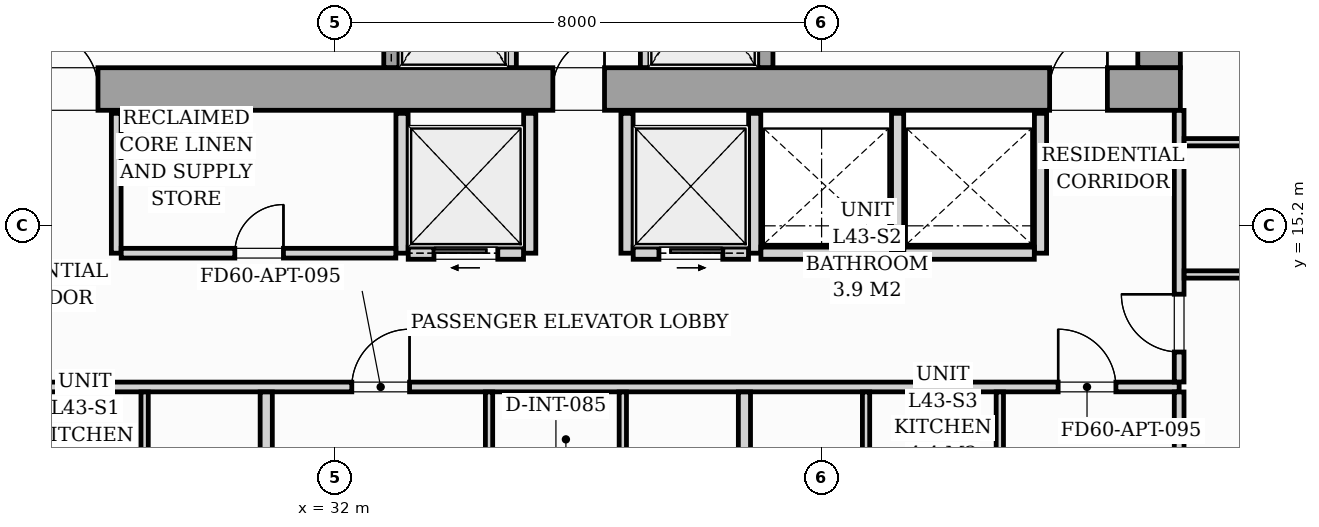
"""IFC4 building model, lengths in metres.
Left out: names, types, materials, properties, quantities, classifications, styles, units other than length and angle.
Written with IfcOpenShell. Run it as: python <this file> out.ifc"""

import sys

from ifc_helpers import new_model, si_unit, direction, frame, frame_2d, origin, origin_2d, place, context, subcontext, project, spatial, rectangle, i_section, extrude, source, transform, mapped, element, fill, save


model = new_model("IFC4")
c1 = context("Model", 3, precision=1e-05, world=origin(), true_north=direction((0.0, 1.0)))
c2 = subcontext(c1, "Body", "Model", "MODEL_VIEW")
j1 = project(units=[si_unit("LENGTHUNIT", "METRE"), si_unit("PLANEANGLEUNIT", "RADIAN")], contexts=[c1])
p1 = place(None, origin())
s1 = spatial("IfcSite", under=j1, at=p1, CompositionType="ELEMENT")
p2 = place(p1, origin())
s2 = spatial("IfcBuilding", under=s1, at=p2, CompositionType="ELEMENT")
p3 = place(p2, frame((0.0, 0.0, 150.2)))
s3 = spatial("IfcBuildingStorey", under=s2, at=p3, CompositionType="ELEMENT", Elevation=150.2)
m1 = source(origin(), c2, "Body", "SweptSolid", [
    extrude(i_section(OverallWidth=0.421, OverallDepth=0.465, WebThickness=0.045, FlangeThickness=0.073, FilletRadius=0.018, at=origin_2d()), origin(), (0.0, 0.0, 1.0), 3.196),
])
for number, where, z_axis, x_axis in (
    (1, (33.12, 17.4, 0.002), (0.0, 0.0, 1.0), (1.0, 0.0, 0.0)),
    (2, (38.88, 17.4, 0.002), (0.0, 0.0, 1.0), (1.0, 0.0, 0.0)),
    (3, (45.6, 17.4, 0.002), (0.0, 0.0, 1.0), (1.0, 0.0, 0.0)),
):
    element("IfcColumn", number, at=place(p3, frame(where, z_axis=z_axis, x_axis=x_axis)), inside=s3, PredefinedType="PILASTER", context=c2, shape_type="MappedRepresentation", body=[
        mapped(m1, transform((0.0, 0.0, 0.0), scale=1.0)),
    ])
p4 = place(p3, frame((26.1, 17.45, 0.0), z_axis=(0.0, 0.0, 1.0), x_axis=(1.0, 0.0, 0.0)))
e4 = element("IfcWall", 4, at=p4, inside=s3, PredefinedType="SHEAR", context=c2, shape_type="SweptSolid", body=[
    extrude(rectangle(XDim=19.8, YDim=0.7, at=frame_2d((9.9, 0.0))), origin(), (0.0, 0.0, 1.0), 3.2),
])
p5 = place(p4, frame((1.05, 0.0, 0.0)))
e5 = element("IfcOpeningElement", 5, at=p5, cuts=e4, PredefinedType="OPENING", context=c2, shape_type="SweptSolid", body=[
    extrude(rectangle(XDim=0.95, YDim=2.06, at=frame_2d((0.475, 1.03))), frame((0.0, 0.36, 0.0), z_axis=(0.0, -1.0, 0.0), x_axis=(1.0, 0.0, 0.0)), (0.0, 0.0, 1.0), 0.72),
])
p6 = place(p4, frame((9.48, 0.0, 0.0)))
e6 = element("IfcOpeningElement", 6, at=p6, cuts=e4, PredefinedType="OPENING", context=c2, shape_type="SweptSolid", body=[
    extrude(rectangle(XDim=0.85, YDim=2.0, at=frame_2d((0.425, 1.0))), frame((0.0, 0.36, 0.0), z_axis=(0.0, -1.0, 0.0), x_axis=(1.0, 0.0, 0.0)), (0.0, 0.0, 1.0), 0.72),
])
p7 = place(p4, frame((17.65, 0.0, 0.0)))
e7 = element("IfcOpeningElement", 7, at=p7, cuts=e4, PredefinedType="OPENING", context=c2, shape_type="SweptSolid", body=[
    extrude(rectangle(XDim=0.95, YDim=2.06, at=frame_2d((0.475, 1.03))), frame((0.0, 0.36, 0.0), z_axis=(0.0, -1.0, 0.0), x_axis=(1.0, 0.0, 0.0)), (0.0, 0.0, 1.0), 0.72),
])
p8 = place(p3, frame((45.55, 17.802, 0.0), z_axis=(0.0, 0.0, 1.0), x_axis=(0.0, 1.0, 0.0)))
e8 = element("IfcWall", 8, at=p8, inside=s3, PredefinedType="SHEAR", context=c2, shape_type="SweptSolid", body=[
    extrude(rectangle(XDim=5.796, YDim=0.7, at=frame_2d((2.898, 0.0))), origin(), (0.0, 0.0, 1.0), 3.2),
])
p9 = place(p3, frame((32.925, 17.802, 0.0), z_axis=(0.0, 0.0, 1.0), x_axis=(0.0, 1.0, 0.0)))
e9 = element("IfcWall", 9, at=p9, inside=s3, PredefinedType="SOLIDWALL", context=c2, shape_type="SweptSolid", body=[
    extrude(rectangle(XDim=2.646, YDim=0.25, at=frame_2d((1.323, 0.0))), origin(), (0.0, 0.0, 1.0), 3.2),
])
p10 = place(p9, frame((0.598, 0.0, 0.0)))
e10 = element("IfcOpeningElement", 10, at=p10, cuts=e9, PredefinedType="OPENING", context=c2, shape_type="SweptSolid", body=[
    extrude(rectangle(XDim=1.1, YDim=2.08, at=frame_2d((0.55, 1.04))), frame((0.0, 0.135, 0.0), z_axis=(0.0, -1.0, 0.0), x_axis=(1.0, 0.0, 0.0)), (0.0, 0.0, 1.0), 0.27),
])
for number, where, z_axis, x_axis in (
    (11, (34.9, 17.802, 0.0), (0.0, 0.0, 1.0), (0.0, 1.0, 0.0)),
    (12, (37.1, 17.802, 0.0), (0.0, 0.0, 1.0), (0.0, 1.0, 0.0)),
):
    element("IfcWall", number, at=place(p3, frame(where, z_axis=z_axis, x_axis=x_axis)), inside=s3, PredefinedType="PARTITIONING", context=c2, shape_type="SweptSolid", body=[
        extrude(rectangle(XDim=2.646, YDim=0.16, at=frame_2d((1.323, 0.0))), origin(), (0.0, 0.0, 1.0), 2.94),
    ])
p11 = place(p3, frame((39.075, 17.802, 0.0), z_axis=(0.0, 0.0, 1.0), x_axis=(0.0, 1.0, 0.0)))
e13 = element("IfcWall", 13, at=p11, inside=s3, PredefinedType="SOLIDWALL", context=c2, shape_type="SweptSolid", body=[
    extrude(rectangle(XDim=2.646, YDim=0.25, at=frame_2d((1.323, 0.0))), origin(), (0.0, 0.0, 1.0), 3.2),
])
p12 = place(p11, frame((0.598, 0.0, 0.0)))
e14 = element("IfcOpeningElement", 14, at=p12, cuts=e13, PredefinedType="OPENING", context=c2, shape_type="SweptSolid", body=[
    extrude(rectangle(XDim=1.1, YDim=2.08, at=frame_2d((0.55, 1.04))), frame((0.0, 0.135, 0.0), z_axis=(0.0, -1.0, 0.0), x_axis=(1.0, 0.0, 0.0)), (0.0, 0.0, 1.0), 0.27),
])
p13 = place(p3, frame((28.4, 14.75, 0.0), z_axis=(0.0, 0.0, 1.0), x_axis=(0.0, 1.0, 0.0)))
e15 = element("IfcWall", 15, at=p13, inside=s3, PredefinedType="PARTITIONING", context=c2, shape_type="SweptSolid", body=[
    extrude(rectangle(XDim=2.3, YDim=0.16, at=frame_2d((1.15, 0.0))), origin(), (0.0, 0.0, 1.0), 2.94),
])
p14 = place(p3, frame((33.1, 14.75, 0.0), z_axis=(0.0, 0.0, 1.0), x_axis=(0.0, 1.0, 0.0)))
e16 = element("IfcWall", 16, at=p14, inside=s3, PredefinedType="PARTITIONING", context=c2, shape_type="SweptSolid", body=[
    extrude(rectangle(XDim=2.3, YDim=0.2, at=frame_2d((1.15, 0.0))), origin(), (0.0, 0.0, 1.0), 2.94),
])
p15 = place(p3, frame((28.482, 14.75, 0.0), z_axis=(0.0, 0.0, 1.0), x_axis=(1.0, 0.0, 0.0)))
e17 = element("IfcWall", 17, at=p15, inside=s3, PredefinedType="PARTITIONING", context=c2, shape_type="SweptSolid", body=[
    extrude(rectangle(XDim=4.516, YDim=0.16, at=frame_2d((2.258, 0.0))), origin(), (0.0, 0.0, 1.0), 2.94),
])
p16 = place(p15, frame((1.868, 0.0, 0.0)))
e18 = element("IfcOpeningElement", 18, at=p16, cuts=e17, PredefinedType="OPENING", context=c2, shape_type="SweptSolid", body=[
    extrude(rectangle(XDim=0.8, YDim=2.05, at=frame_2d((0.4, 1.025))), frame((0.0, 0.09, 0.0), z_axis=(0.0, -1.0, 0.0), x_axis=(1.0, 0.0, 0.0)), (0.0, 0.0, 1.0), 0.18),
])
p17 = place(p3, frame((35.2, 14.75, 0.0), z_axis=(0.0, 0.0, 1.0), x_axis=(0.0, 1.0, 0.0)))
e19 = element("IfcWall", 19, at=p17, inside=s3, PredefinedType="PARTITIONING", context=c2, shape_type="SweptSolid", body=[
    extrude(rectangle(XDim=2.3, YDim=0.2, at=frame_2d((1.15, 0.0))), origin(), (0.0, 0.0, 1.0), 2.94),
])
p18 = place(p3, frame((33.202, 14.75, 0.0), z_axis=(0.0, 0.0, 1.0), x_axis=(1.0, 0.0, 0.0)))
e20 = element("IfcWall", 20, at=p18, inside=s3, PredefinedType="PARTITIONING", context=c2, shape_type="SweptSolid", body=[
    extrude(rectangle(XDim=1.896, YDim=0.2, at=frame_2d((0.948, 0.0))), origin(), (0.0, 0.0, 1.0), 2.94),
])
p19 = place(p18, frame((0.423, 0.0, 0.0)))
e21 = element("IfcOpeningElement", 21, at=p19, cuts=e20, PredefinedType="OPENING", context=c2, shape_type="SweptSolid", body=[
    extrude(rectangle(XDim=1.05, YDim=2.08, at=frame_2d((0.525, 1.04))), frame((0.0, 0.11, 0.0), z_axis=(0.0, -1.0, 0.0), x_axis=(1.0, 0.0, 0.0)), (0.0, 0.0, 1.0), 0.22),
])
for number, where, z_axis, x_axis in (
    (22, (36.8, 14.75, 0.0), (0.0, 0.0, 1.0), (0.0, 1.0, 0.0)),
    (23, (38.9, 14.75, 0.0), (0.0, 0.0, 1.0), (0.0, 1.0, 0.0)),
):
    element("IfcWall", number, at=place(p3, frame(where, z_axis=z_axis, x_axis=x_axis)), inside=s3, PredefinedType="PARTITIONING", context=c2, shape_type="SweptSolid", body=[
        extrude(rectangle(XDim=2.3, YDim=0.2, at=frame_2d((1.15, 0.0))), origin(), (0.0, 0.0, 1.0), 2.94),
    ])
p20 = place(p3, frame((36.902, 14.75, 0.0), z_axis=(0.0, 0.0, 1.0), x_axis=(1.0, 0.0, 0.0)))
e24 = element("IfcWall", 24, at=p20, inside=s3, PredefinedType="PARTITIONING", context=c2, shape_type="SweptSolid", body=[
    extrude(rectangle(XDim=1.896, YDim=0.2, at=frame_2d((0.948, 0.0))), origin(), (0.0, 0.0, 1.0), 2.94),
])
p21 = place(p20, frame((0.423, 0.0, 0.0)))
e25 = element("IfcOpeningElement", 25, at=p21, cuts=e24, PredefinedType="OPENING", context=c2, shape_type="SweptSolid", body=[
    extrude(rectangle(XDim=1.05, YDim=2.08, at=frame_2d((0.525, 1.04))), frame((0.0, 0.11, 0.0), z_axis=(0.0, -1.0, 0.0), x_axis=(1.0, 0.0, 0.0)), (0.0, 0.0, 1.0), 0.22),
])
for number, where, z_axis, x_axis in (
    (26, (41.25, 14.75, 0.0), (0.0, 0.0, 1.0), (0.0, 1.0, 0.0)),
    (27, (43.6, 14.75, 0.0), (0.0, 0.0, 1.0), (0.0, 1.0, 0.0)),
):
    element("IfcWall", number, at=place(p3, frame(where, z_axis=z_axis, x_axis=x_axis)), inside=s3, PredefinedType="PARTITIONING", context=c2, shape_type="SweptSolid", body=[
        extrude(rectangle(XDim=2.3, YDim=0.2, at=frame_2d((1.15, 0.0))), origin(), (0.0, 0.0, 1.0), 2.94),
    ])
for number, where, z_axis, x_axis in (
    (28, (39.002, 14.75, 0.0), (0.0, 0.0, 1.0), (1.0, 0.0, 0.0)),
    (29, (41.352, 14.75, 0.0), (0.0, 0.0, 1.0), (1.0, 0.0, 0.0)),
):
    element("IfcWall", number, at=place(p3, frame(where, z_axis=z_axis, x_axis=x_axis)), inside=s3, PredefinedType="PARTITIONING", context=c2, shape_type="SweptSolid", body=[
        extrude(rectangle(XDim=2.146, YDim=0.2, at=frame_2d((1.073, 0.0))), origin(), (0.0, 0.0, 1.0), 2.94),
    ])
p22 = place(p3, frame((22.05, 12.55, 0.0), z_axis=(0.0, 0.0, 1.0), x_axis=(1.0, 0.0, 0.0)))
e30 = element("IfcWall", 30, at=p22, inside=s3, PredefinedType="PARTITIONING", context=c2, shape_type="SweptSolid", body=[
    extrude(rectangle(XDim=23.83, YDim=0.16, at=frame_2d((11.915, 0.0))), origin(), (0.0, 0.0, 1.0), 2.94),
])
p23 = place(p22, frame((1.873, 0.0, 0.0)))
e31 = element("IfcOpeningElement", 31, at=p23, cuts=e30, PredefinedType="OPENING", context=c2, shape_type="SweptSolid", body=[
    extrude(rectangle(XDim=0.95, YDim=2.06, at=frame_2d((0.475, 1.03))), frame((0.0, 0.09, 0.0), z_axis=(0.0, -1.0, 0.0), x_axis=(1.0, 0.0, 0.0)), (0.0, 0.0, 1.0), 0.18),
])
p24 = place(p22, frame((10.224, 0.0, 0.0)))
e32 = element("IfcOpeningElement", 32, at=p24, cuts=e30, PredefinedType="OPENING", context=c2, shape_type="SweptSolid", body=[
    extrude(rectangle(XDim=0.95, YDim=2.06, at=frame_2d((0.475, 1.03))), frame((0.0, 0.09, 0.0), z_axis=(0.0, -1.0, 0.0), x_axis=(1.0, 0.0, 0.0)), (0.0, 0.0, 1.0), 0.18),
])
p25 = place(p22, frame((21.84, 0.0, 0.0)))
e33 = element("IfcOpeningElement", 33, at=p25, cuts=e30, PredefinedType="OPENING", context=c2, shape_type="SweptSolid", body=[
    extrude(rectangle(XDim=0.95, YDim=2.06, at=frame_2d((0.475, 1.03))), frame((0.0, 0.09, 0.0), z_axis=(0.0, -1.0, 0.0), x_axis=(1.0, 0.0, 0.0)), (0.0, 0.0, 1.0), 0.18),
])
p26 = place(p3, frame((45.88, 5.958, 0.0), z_axis=(0.0, 0.0, 1.0), x_axis=(0.0, 1.0, 0.0)))
e34 = element("IfcWall", 34, at=p26, inside=s3, PredefinedType="PARTITIONING", context=c2, shape_type="SweptSolid", body=[
    extrude(rectangle(XDim=6.51, YDim=0.16, at=frame_2d((3.255, 0.0))), origin(), (0.0, 0.0, 1.0), 2.94),
])
p27 = place(p3, frame((45.88, 12.632, 0.0), z_axis=(0.0, 0.0, 1.0), x_axis=(0.0, 1.0, 0.0)))
e35 = element("IfcWall", 35, at=p27, inside=s3, PredefinedType="PARTITIONING", context=c2, shape_type="SweptSolid", body=[
    extrude(rectangle(XDim=4.466, YDim=0.16, at=frame_2d((2.233, 0.0))), origin(), (0.0, 0.0, 1.0), 2.94),
])
p28 = place(p27, frame((0.493, 0.0, 0.0)))
e36 = element("IfcOpeningElement", 36, at=p28, cuts=e35, PredefinedType="OPENING", context=c2, shape_type="SweptSolid", body=[
    extrude(rectangle(XDim=0.95, YDim=2.06, at=frame_2d((0.475, 1.03))), frame((0.0, 0.09, 0.0), z_axis=(0.0, -1.0, 0.0), x_axis=(1.0, 0.0, 0.0)), (0.0, 0.0, 1.0), 0.18),
])
p29 = place(p3, frame((28.867, 10.362, 0.0), z_axis=(0.0, 0.0, 1.0), x_axis=(0.0, 1.0, 0.0)))
e37 = element("IfcWall", 37, at=p29, inside=s3, PredefinedType="PARTITIONING", context=c2, shape_type="SweptSolid", body=[
    extrude(rectangle(XDim=2.106, YDim=0.12, at=frame_2d((1.053, 0.0))), origin(), (0.0, 0.0, 1.0), 2.94),
])
p30 = place(p3, frame((30.867, 10.362, 0.0), z_axis=(0.0, 0.0, 1.0), x_axis=(0.0, 1.0, 0.0)))
e38 = element("IfcWall", 38, at=p30, inside=s3, PredefinedType="PARTITIONING", context=c2, shape_type="SweptSolid", body=[
    extrude(rectangle(XDim=2.106, YDim=0.2, at=frame_2d((1.053, 0.0))), origin(), (0.0, 0.0, 1.0), 2.94),
])
for number, where, z_axis, x_axis in (
    (39, (34.531, 10.362, 0.0), (0.0, 0.0, 1.0), (0.0, 1.0, 0.0)),
    (40, (36.731, 10.362, 0.0), (0.0, 0.0, 1.0), (0.0, 1.0, 0.0)),
):
    element("IfcWall", number, at=place(p3, frame(where, z_axis=z_axis, x_axis=x_axis)), inside=s3, PredefinedType="PARTITIONING", context=c2, shape_type="SweptSolid", body=[
        extrude(rectangle(XDim=2.106, YDim=0.12, at=frame_2d((1.053, 0.0))), origin(), (0.0, 0.0, 1.0), 2.94),
    ])
p31 = place(p3, frame((38.731, 10.362, 0.0), z_axis=(0.0, 0.0, 1.0), x_axis=(0.0, 1.0, 0.0)))
e41 = element("IfcWall", 41, at=p31, inside=s3, PredefinedType="PARTITIONING", context=c2, shape_type="SweptSolid", body=[
    extrude(rectangle(XDim=2.106, YDim=0.2, at=frame_2d((1.053, 0.0))), origin(), (0.0, 0.0, 1.0), 2.94),
])
for number, where, z_axis, x_axis in (
    (42, (42.931, 10.362, 0.0), (0.0, 0.0, 1.0), (0.0, 1.0, 0.0)),
    (43, (40.731, 10.362, 0.0), (0.0, 0.0, 1.0), (0.0, 1.0, 0.0)),
):
    element("IfcWall", number, at=place(p3, frame(where, z_axis=z_axis, x_axis=x_axis)), inside=s3, PredefinedType="PARTITIONING", context=c2, shape_type="SweptSolid", body=[
        extrude(rectangle(XDim=2.106, YDim=0.12, at=frame_2d((1.053, 0.0))), origin(), (0.0, 0.0, 1.0), 2.94),
    ])
for number, where, z_axis, x_axis in (
    (44, (45.962, 16.575, 0.0), (0.0, 0.0, 1.0), (1.0, 0.0, 0.0)),
    (45, (45.962, 14.4, 0.0), (0.0, 0.0, 1.0), (1.0, 0.0, 0.0)),
):
    element("IfcWall", number, at=place(p3, frame(where, z_axis=z_axis, x_axis=x_axis)), inside=s3, PredefinedType="PARTITIONING", context=c2, shape_type="SweptSolid", body=[
        extrude(rectangle(XDim=2.256, YDim=0.12, at=frame_2d((1.128, 0.0))), origin(), (0.0, 0.0, 1.0), 2.94),
    ])
m2 = source(origin(), c2, "Body", "SweptSolid", [
    extrude(rectangle(XDim=0.95, YDim=2.06, at=frame_2d((0.475, 1.03))), frame((0.0, 0.025, 0.0), z_axis=(0.0, -1.0, 0.0), x_axis=(1.0, 0.0, 0.0)), (0.0, 0.0, 1.0), 0.05),
])
p32 = place(p5, origin())
e46 = element("IfcDoor", 46, at=p32, inside=s3, OperationType="SINGLE_SWING_LEFT", PredefinedType="DOOR", context=c2, shape_type="MappedRepresentation", body=[
    mapped(m2, transform((0.0, 0.0, 0.0), scale=1.0)),
])
fill(e5, e46)
m3 = source(origin(), c2, "Body", "SweptSolid", [
    extrude(rectangle(XDim=0.85, YDim=2.0, at=frame_2d((0.425, 1.0))), frame((0.0, 0.025, 0.0), z_axis=(0.0, -1.0, 0.0), x_axis=(1.0, 0.0, 0.0)), (0.0, 0.0, 1.0), 0.05),
])
p33 = place(p6, origin())
e47 = element("IfcDoor", 47, at=p33, inside=s3, OperationType="SINGLE_SWING_RIGHT", PredefinedType="DOOR", context=c2, shape_type="MappedRepresentation", body=[
    mapped(m3, transform((0.0, 0.0, 0.0), scale=1.0)),
])
fill(e6, e47)
p34 = place(p7, origin())
e48 = element("IfcDoor", 48, at=p34, inside=s3, OperationType="SINGLE_SWING_RIGHT", PredefinedType="DOOR", context=c2, shape_type="MappedRepresentation", body=[
    mapped(m2, transform((0.0, 0.0, 0.0), scale=1.0)),
])
fill(e7, e48)
m4 = source(origin(), c2, "Body", "SweptSolid", [
    extrude(rectangle(XDim=0.8, YDim=2.05, at=frame_2d((0.4, 1.025))), frame((0.0, 0.025, 0.0), z_axis=(0.0, -1.0, 0.0), x_axis=(1.0, 0.0, 0.0)), (0.0, 0.0, 1.0), 0.05),
])
p35 = place(p16, origin())
e49 = element("IfcDoor", 49, at=p35, inside=s3, OperationType="SINGLE_SWING_RIGHT", PredefinedType="DOOR", context=c2, shape_type="MappedRepresentation", body=[
    mapped(m4, transform((0.0, 0.0, 0.0), scale=1.0)),
])
fill(e18, e49)
m5 = source(origin(), c2, "Body", "SweptSolid", [
    extrude(rectangle(XDim=1.05, YDim=2.08, at=frame_2d((0.525, 1.04))), frame((0.0, 0.025, 0.0), z_axis=(0.0, -1.0, 0.0), x_axis=(1.0, 0.0, 0.0)), (0.0, 0.0, 1.0), 0.05),
])
p36 = place(p19, origin())
e50 = element("IfcDoor", 50, at=p36, inside=s3, OperationType="SLIDING_TO_LEFT", PredefinedType="DOOR", context=c2, shape_type="MappedRepresentation", body=[
    mapped(m5, transform((0.0, 0.0, 0.0), scale=1.0)),
])
fill(e21, e50)
p37 = place(p21, origin())
e51 = element("IfcDoor", 51, at=p37, inside=s3, OperationType="SLIDING_TO_RIGHT", PredefinedType="DOOR", context=c2, shape_type="MappedRepresentation", body=[
    mapped(m5, transform((0.0, 0.0, 0.0), scale=1.0)),
])
fill(e25, e51)
m6 = source(origin(), c2, "Body", "SweptSolid", [
    extrude(rectangle(XDim=0.95, YDim=2.06, at=frame_2d((0.475, 1.03))), frame((0.0, 0.025, 0.0), z_axis=(0.0, -1.0, 0.0), x_axis=(1.0, 0.0, 0.0)), (0.0, 0.0, 1.0), 0.05),
])
p38 = place(p24, origin())
e52 = element("IfcDoor", 52, at=p38, inside=s3, OperationType="SINGLE_SWING_RIGHT", PredefinedType="DOOR", context=c2, shape_type="MappedRepresentation", body=[
    mapped(m6, transform((0.0, 0.0, 0.0), scale=1.0)),
])
fill(e32, e52)
p39 = place(p25, origin())
e53 = element("IfcDoor", 53, at=p39, inside=s3, OperationType="SINGLE_SWING_LEFT", PredefinedType="DOOR", context=c2, shape_type="MappedRepresentation", body=[
    mapped(m6, transform((0.0, 0.0, 0.0), scale=1.0)),
])
fill(e33, e53)
p40 = place(p28, origin())
e54 = element("IfcDoor", 54, at=p40, inside=s3, OperationType="SINGLE_SWING_RIGHT", PredefinedType="DOOR", context=c2, shape_type="MappedRepresentation", body=[
    mapped(m6, transform((0.0, 0.0, 0.0), scale=1.0)),
])
fill(e36, e54)
save(model, sys.argv[1])
